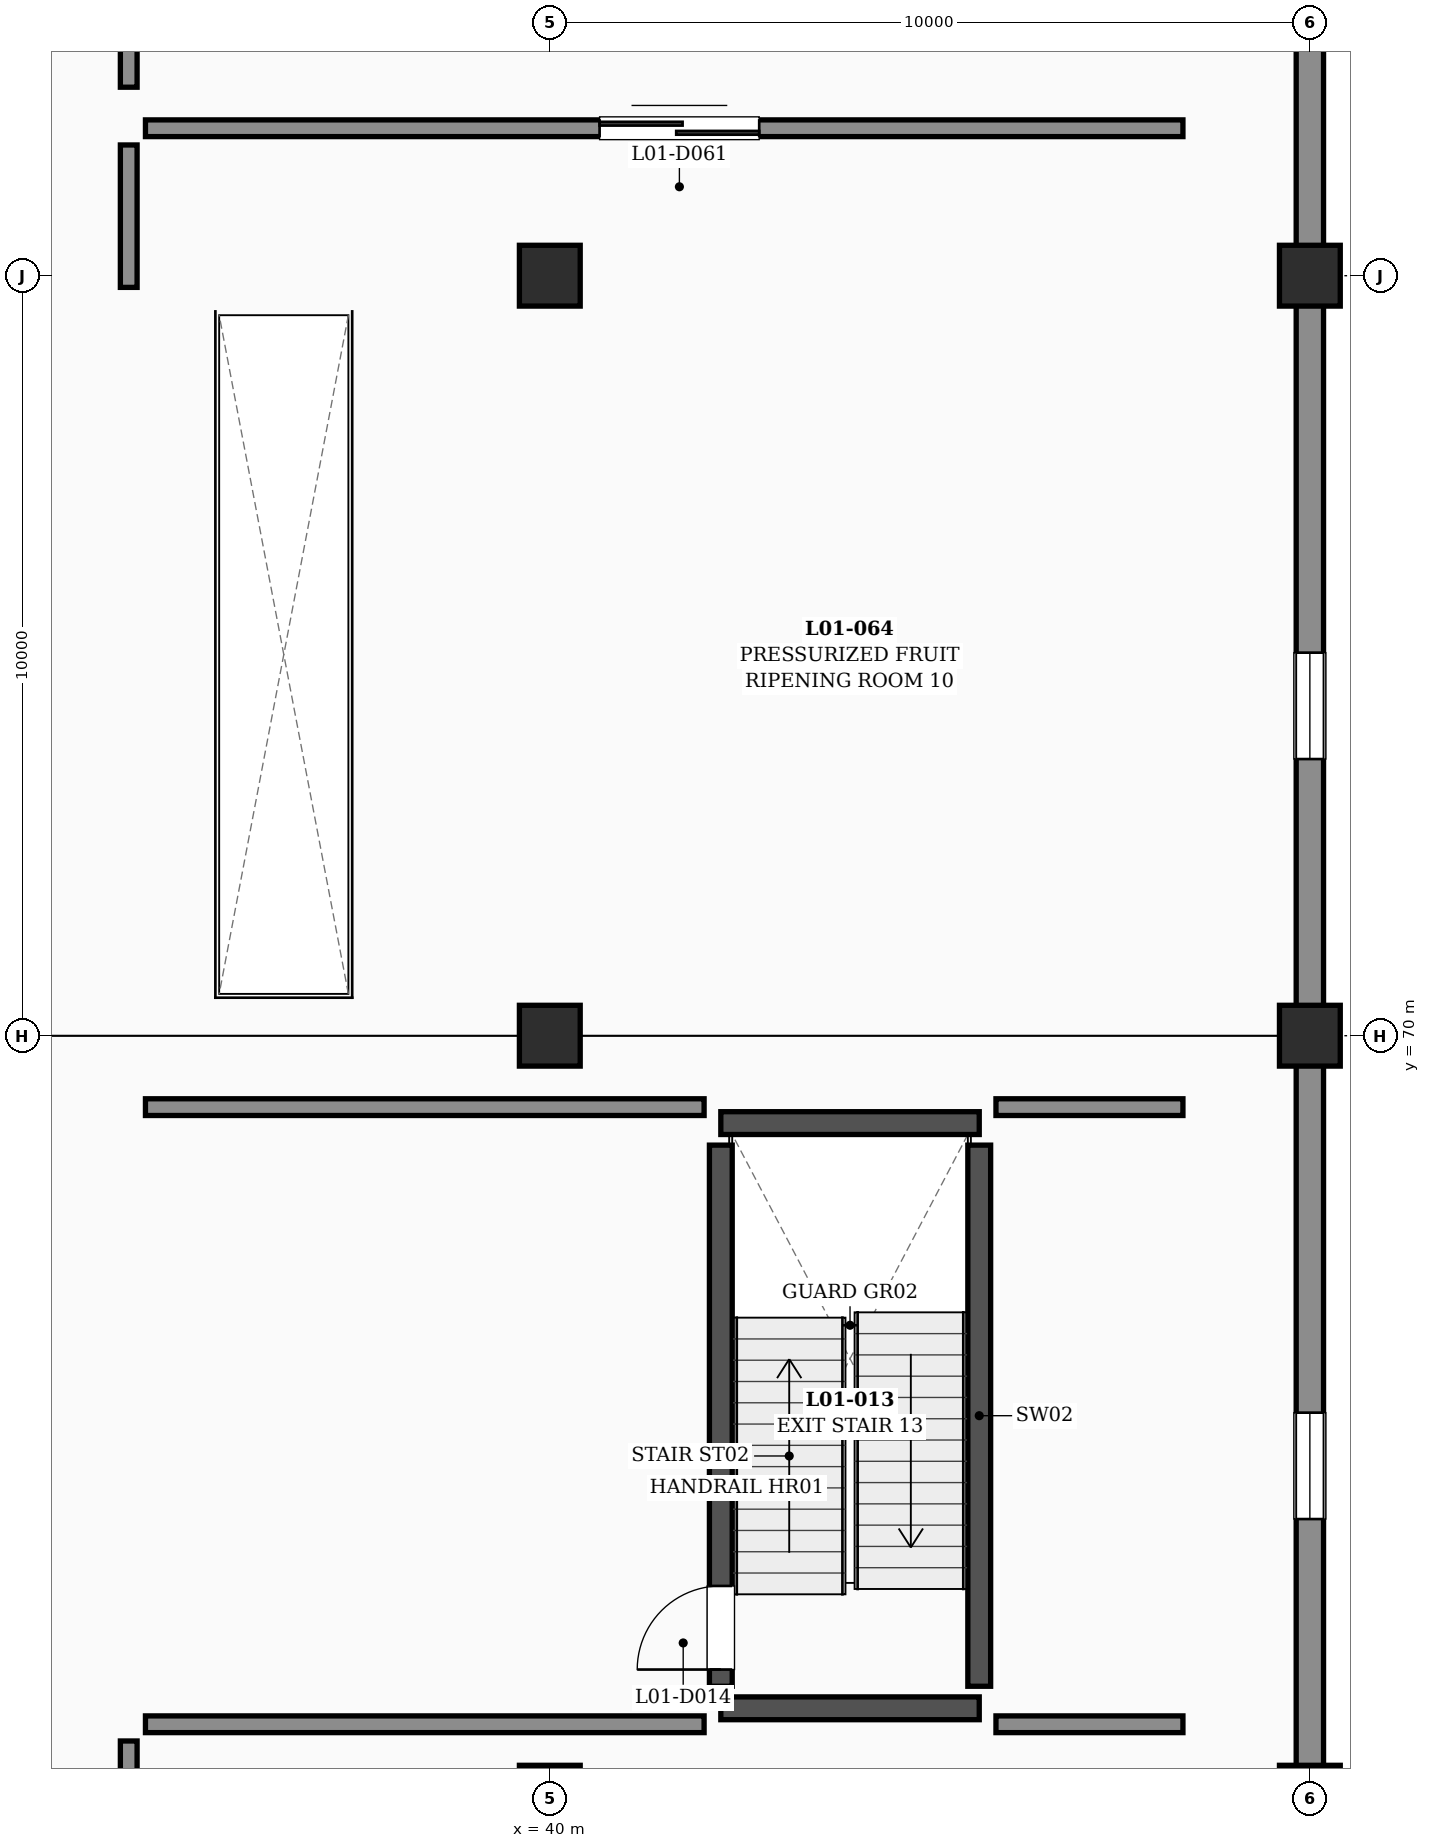
"""IFC4 building model, lengths in metres.
Left out: names, types, materials, properties, quantities, classifications, styles, units other than length and angle.
Written with IfcOpenShell. Run it as: python <this file> out.ifc"""

import sys

from ifc_helpers import new_model, si_unit, direction, frame, frame_2d, origin, origin_2d, place, context, subcontext, project, spatial, rectangle, extrude, element, fill, save


model = new_model("IFC4")
c1 = context("Model", 3, precision=1e-05, world=origin(), true_north=direction((0.0, 1.0)))
c2 = subcontext(c1, "Body", "Model", "MODEL_VIEW")
j1 = project(units=[si_unit("LENGTHUNIT", "METRE"), si_unit("PLANEANGLEUNIT", "RADIAN")], contexts=[c1])
p1 = place(None, origin())
s1 = spatial("IfcSite", under=j1, at=p1, CompositionType="ELEMENT")
p2 = place(p1, origin())
s2 = spatial("IfcBuilding", under=s1, at=p2, CompositionType="ELEMENT")
p3 = place(p2, frame((0.0, 0.0, 6.0)))
s3 = spatial("IfcBuildingStorey", under=s2, at=p3, CompositionType="ELEMENT", Elevation=6.0)
for number, where, z_axis, x_axis in (
    (1, (40.0, 60.0, 0.0), (0.0, 0.0, 1.0), (1.0, 0.0, 0.0)),
    (2, (40.0, 70.0, 0.0), (0.0, 0.0, 1.0), (1.0, 0.0, 0.0)),
    (3, (40.0, 80.0, 0.0), (0.0, 0.0, 1.0), (1.0, 0.0, 0.0)),
    (4, (50.0, 60.0, 0.0), (0.0, 0.0, 1.0), (1.0, 0.0, 0.0)),
    (5, (50.0, 70.0, 0.0), (0.0, 0.0, 1.0), (1.0, 0.0, 0.0)),
    (6, (50.0, 80.0, 0.0), (0.0, 0.0, 1.0), (1.0, 0.0, 0.0)),
):
    element("IfcColumn", number, at=place(p3, frame(where, z_axis=z_axis, x_axis=x_axis)), inside=s3, PredefinedType="COLUMN", context=c2, shape_type="SweptSolid", body=[
        extrude(rectangle(XDim=0.8, YDim=0.8, at=origin_2d()), origin(), (0.0, 0.0, 1.0), 4.8),
    ])
p4 = place(p3, frame((50.0, 60.24, 0.0), z_axis=(0.0, 0.0, 1.0), x_axis=(0.0, 1.0, 0.0)))
e7 = element("IfcWall", 7, at=p4, inside=s3, PredefinedType="SOLIDWALL", context=c2, shape_type="SweptSolid", body=[
    extrude(rectangle(XDim=9.52, YDim=0.36, at=frame_2d((4.76, 0.0))), origin(), (0.0, 0.0, 1.0), 3.61),
])
p5 = place(p4, frame((3.4, 0.0, 1.2)))
e8 = element("IfcOpeningElement", 8, at=p5, cuts=e7, PredefinedType="OPENING", context=c2, shape_type="SweptSolid", body=[
    extrude(rectangle(XDim=1.4, YDim=1.35, at=frame_2d((0.7, 0.675))), frame((0.0, 0.19, 0.0), z_axis=(0.0, -1.0, 0.0), x_axis=(1.0, 0.0, 0.0)), (0.0, 0.0, 1.0), 0.38),
])
p6 = place(p3, frame((50.0, 70.24, 0.0), z_axis=(0.0, 0.0, 1.0), x_axis=(0.0, 1.0, 0.0)))
e9 = element("IfcWall", 9, at=p6, inside=s3, PredefinedType="SOLIDWALL", context=c2, shape_type="SweptSolid", body=[
    extrude(rectangle(XDim=9.52, YDim=0.36, at=frame_2d((4.76, 0.0))), origin(), (0.0, 0.0, 1.0), 3.61),
])
p7 = place(p6, frame((3.4, 0.0, 1.2)))
e10 = element("IfcOpeningElement", 10, at=p7, cuts=e9, PredefinedType="OPENING", context=c2, shape_type="SweptSolid", body=[
    extrude(rectangle(XDim=1.4, YDim=1.35, at=frame_2d((0.7, 0.675))), frame((0.0, 0.19, 0.0), z_axis=(0.0, -1.0, 0.0), x_axis=(1.0, 0.0, 0.0)), (0.0, 0.0, 1.0), 0.38),
])
p8 = place(p3, frame((50.0, 80.24, 0.0), z_axis=(0.0, 0.0, 1.0), x_axis=(0.0, 1.0, 0.0)))
e11 = element("IfcWall", 11, at=p8, inside=s3, PredefinedType="SOLIDWALL", context=c2, shape_type="SweptSolid", body=[
    extrude(rectangle(XDim=9.52, YDim=0.36, at=frame_2d((4.76, 0.0))), origin(), (0.0, 0.0, 1.0), 3.61),
])
p9 = place(p8, frame((3.4, 0.0, 1.2)))
e12 = element("IfcOpeningElement", 12, at=p9, cuts=e11, PredefinedType="OPENING", context=c2, shape_type="SweptSolid", body=[
    extrude(rectangle(XDim=1.4, YDim=1.35, at=frame_2d((0.7, 0.675))), frame((0.0, 0.19, 0.0), z_axis=(0.0, -1.0, 0.0), x_axis=(1.0, 0.0, 0.0)), (0.0, 0.0, 1.0), 0.38),
])
for number, where, z_axis, x_axis in (
    (13, (42.25, 61.15, 0.0), (0.0, 0.0, 1.0), (1.0, 0.0, 0.0)),
    (14, (42.25, 68.85, 0.0), (0.0, 0.0, 1.0), (1.0, 0.0, 0.0)),
):
    element("IfcWall", number, at=place(p3, frame(where, z_axis=z_axis, x_axis=x_axis)), inside=s3, PredefinedType="SHEAR", context=c2, shape_type="SweptSolid", body=[
        extrude(rectangle(XDim=3.4, YDim=0.3, at=frame_2d((1.7, 0.0))), origin(), (0.0, 0.0, 1.0), 4.8),
    ])
p10 = place(p3, frame((42.25, 61.44, 0.0), z_axis=(0.0, 0.0, 1.0), x_axis=(0.0, 1.0, 0.0)))
e15 = element("IfcWall", 15, at=p10, inside=s3, PredefinedType="SHEAR", context=c2, shape_type="SweptSolid", body=[
    extrude(rectangle(XDim=7.12, YDim=0.3, at=frame_2d((3.56, 0.0))), origin(), (0.0, 0.0, 1.0), 4.8),
])
p11 = place(p10, frame((0.22, 0.0, 0.0)))
e16 = element("IfcOpeningElement", 16, at=p11, cuts=e15, PredefinedType="OPENING", context=c2, shape_type="SweptSolid", body=[
    extrude(rectangle(XDim=1.1, YDim=2.2, at=frame_2d((0.55, 1.1))), frame((0.0, 0.16, 0.0), z_axis=(0.0, -1.0, 0.0), x_axis=(1.0, 0.0, 0.0)), (0.0, 0.0, 1.0), 0.32),
])
p12 = place(p3, frame((45.65, 61.44, 0.0), z_axis=(0.0, 0.0, 1.0), x_axis=(0.0, 1.0, 0.0)))
e17 = element("IfcWall", 17, at=p12, inside=s3, PredefinedType="SHEAR", context=c2, shape_type="SweptSolid", body=[
    extrude(rectangle(XDim=7.12, YDim=0.3, at=frame_2d((3.56, 0.0))), origin(), (0.0, 0.0, 1.0), 4.8),
])
p13 = place(p3, frame((34.46, 45.48, 0.0), z_axis=(0.0, 0.0, 1.0), x_axis=(0.0, 1.0, 0.0)))
e18 = element("IfcWall", 18, at=p13, inside=s3, PredefinedType="PARTITIONING", context=c2, shape_type="SweptSolid", body=[
    extrude(rectangle(XDim=15.24, YDim=0.22, at=frame_2d((7.62, 0.0))), origin(), (0.0, 0.0, 1.0), 3.51),
])
p14 = place(p13, frame((6.77, 0.0, 0.0)))
e19 = element("IfcOpeningElement", 19, at=p14, cuts=e18, PredefinedType="OPENING", context=c2, shape_type="SweptSolid", body=[
    extrude(rectangle(XDim=2.1, YDim=2.4, at=frame_2d((1.05, 1.2))), frame((0.0, 0.12, 0.0), z_axis=(0.0, -1.0, 0.0), x_axis=(1.0, 0.0, 0.0)), (0.0, 0.0, 1.0), 0.24),
])
p15 = place(p3, frame((34.68, 60.94, 0.0), z_axis=(0.0, 0.0, 1.0), x_axis=(1.0, 0.0, 0.0)))
e20 = element("IfcWall", 20, at=p15, inside=s3, PredefinedType="PARTITIONING", context=c2, shape_type="SweptSolid", body=[
    extrude(rectangle(XDim=7.35, YDim=0.22, at=frame_2d((3.675, 0.0))), origin(), (0.0, 0.0, 1.0), 3.51),
])
p16 = place(p3, frame((45.87, 60.94, 0.0), z_axis=(0.0, 0.0, 1.0), x_axis=(1.0, 0.0, 0.0)))
e21 = element("IfcWall", 21, at=p16, inside=s3, PredefinedType="PARTITIONING", context=c2, shape_type="SweptSolid", body=[
    extrude(rectangle(XDim=2.46, YDim=0.22, at=frame_2d((1.23, 0.0))), origin(), (0.0, 0.0, 1.0), 3.81),
])
p17 = place(p3, frame((34.46, 79.846, 0.0), z_axis=(0.0, 0.0, 1.0), x_axis=(0.0, 1.0, 0.0)))
e22 = element("IfcWall", 22, at=p17, inside=s3, PredefinedType="PARTITIONING", context=c2, shape_type="SweptSolid", body=[
    extrude(rectangle(XDim=1.874, YDim=0.22, at=frame_2d((0.937, 0.0))), origin(), (0.0, 0.0, 1.0), 3.51),
])
p18 = place(p3, frame((34.68, 81.94, 0.0), z_axis=(0.0, 0.0, 1.0), x_axis=(1.0, 0.0, 0.0)))
e23 = element("IfcWall", 23, at=p18, inside=s3, PredefinedType="PARTITIONING", context=c2, shape_type="SweptSolid", body=[
    extrude(rectangle(XDim=13.65, YDim=0.22, at=frame_2d((6.825, 0.0))), origin(), (0.0, 0.0, 1.0), 3.51),
])
p19 = place(p18, frame((5.975, 0.0, 0.0)))
e24 = element("IfcOpeningElement", 24, at=p19, cuts=e23, PredefinedType="OPENING", context=c2, shape_type="SweptSolid", body=[
    extrude(rectangle(XDim=2.1, YDim=2.4, at=frame_2d((1.05, 1.2))), frame((0.0, 0.12, 0.0), z_axis=(0.0, -1.0, 0.0), x_axis=(1.0, 0.0, 0.0)), (0.0, 0.0, 1.0), 0.24),
])
p20 = place(p3, frame((48.33, 69.06, 0.0), z_axis=(0.0, 0.0, 1.0), x_axis=(-1.0, 0.0, 0.0)))
e25 = element("IfcWall", 25, at=p20, inside=s3, PredefinedType="PARTITIONING", context=c2, shape_type="SweptSolid", body=[
    extrude(rectangle(XDim=2.46, YDim=0.22, at=frame_2d((1.23, 0.0))), origin(), (0.0, 0.0, 1.0), 3.81),
])
p21 = place(p3, frame((42.03, 69.06, 0.0), z_axis=(0.0, 0.0, 1.0), x_axis=(-1.0, 0.0, 0.0)))
e26 = element("IfcWall", 26, at=p21, inside=s3, PredefinedType="PARTITIONING", context=c2, shape_type="SweptSolid", body=[
    extrude(rectangle(XDim=7.35, YDim=0.22, at=frame_2d((3.675, 0.0))), origin(), (0.0, 0.0, 1.0), 3.51),
])
p22 = place(p3, frame((34.46, 82.48, 0.0), z_axis=(0.0, 0.0, 1.0), x_axis=(0.0, 1.0, 0.0)))
e27 = element("IfcWall", 27, at=p22, inside=s3, PredefinedType="PARTITIONING", context=c2, shape_type="SweptSolid", body=[
    extrude(rectangle(XDim=13.24, YDim=0.22, at=frame_2d((6.62, 0.0))), origin(), (0.0, 0.0, 1.0), 3.51),
])
p23 = place(p5, origin())
e28 = element("IfcWindow", 28, at=p23, inside=s3, PartitioningType="SINGLE_PANEL", PredefinedType="WINDOW", context=c2, shape_type="SweptSolid", body=[
    extrude(rectangle(XDim=1.4, YDim=1.35, at=frame_2d((0.7, 0.675))), frame((0.0, 0.03, 0.0), z_axis=(0.0, -1.0, 0.0), x_axis=(1.0, 0.0, 0.0)), (0.0, 0.0, 1.0), 0.06),
])
fill(e8, e28)
p24 = place(p7, origin())
e29 = element("IfcWindow", 29, at=p24, inside=s3, PartitioningType="SINGLE_PANEL", PredefinedType="WINDOW", context=c2, shape_type="SweptSolid", body=[
    extrude(rectangle(XDim=1.4, YDim=1.35, at=frame_2d((0.7, 0.675))), frame((0.0, 0.03, 0.0), z_axis=(0.0, -1.0, 0.0), x_axis=(1.0, 0.0, 0.0)), (0.0, 0.0, 1.0), 0.06),
])
fill(e10, e29)
p25 = place(p11, origin())
e30 = element("IfcDoor", 30, at=p25, inside=s3, OperationType="SINGLE_SWING_LEFT", PredefinedType="DOOR", context=c2, shape_type="SweptSolid", body=[
    extrude(rectangle(XDim=1.1, YDim=2.2, at=frame_2d((0.55, 1.1))), frame((0.0, 0.025, 0.0), z_axis=(0.0, -1.0, 0.0), x_axis=(1.0, 0.0, 0.0)), (0.0, 0.0, 1.0), 0.05),
])
fill(e16, e30)
p26 = place(p19, origin())
e31 = element("IfcDoor", 31, at=p26, inside=s3, OperationType="DOUBLE_DOOR_SLIDING", PredefinedType="DOOR", context=c2, shape_type="SweptSolid", body=[
    extrude(rectangle(XDim=2.1, YDim=2.4, at=frame_2d((1.05, 1.2))), frame((0.0, 0.025, 0.0), z_axis=(0.0, -1.0, 0.0), x_axis=(1.0, 0.0, 0.0)), (0.0, 0.0, 1.0), 0.05),
])
fill(e24, e31)
save(model, sys.argv[1])
